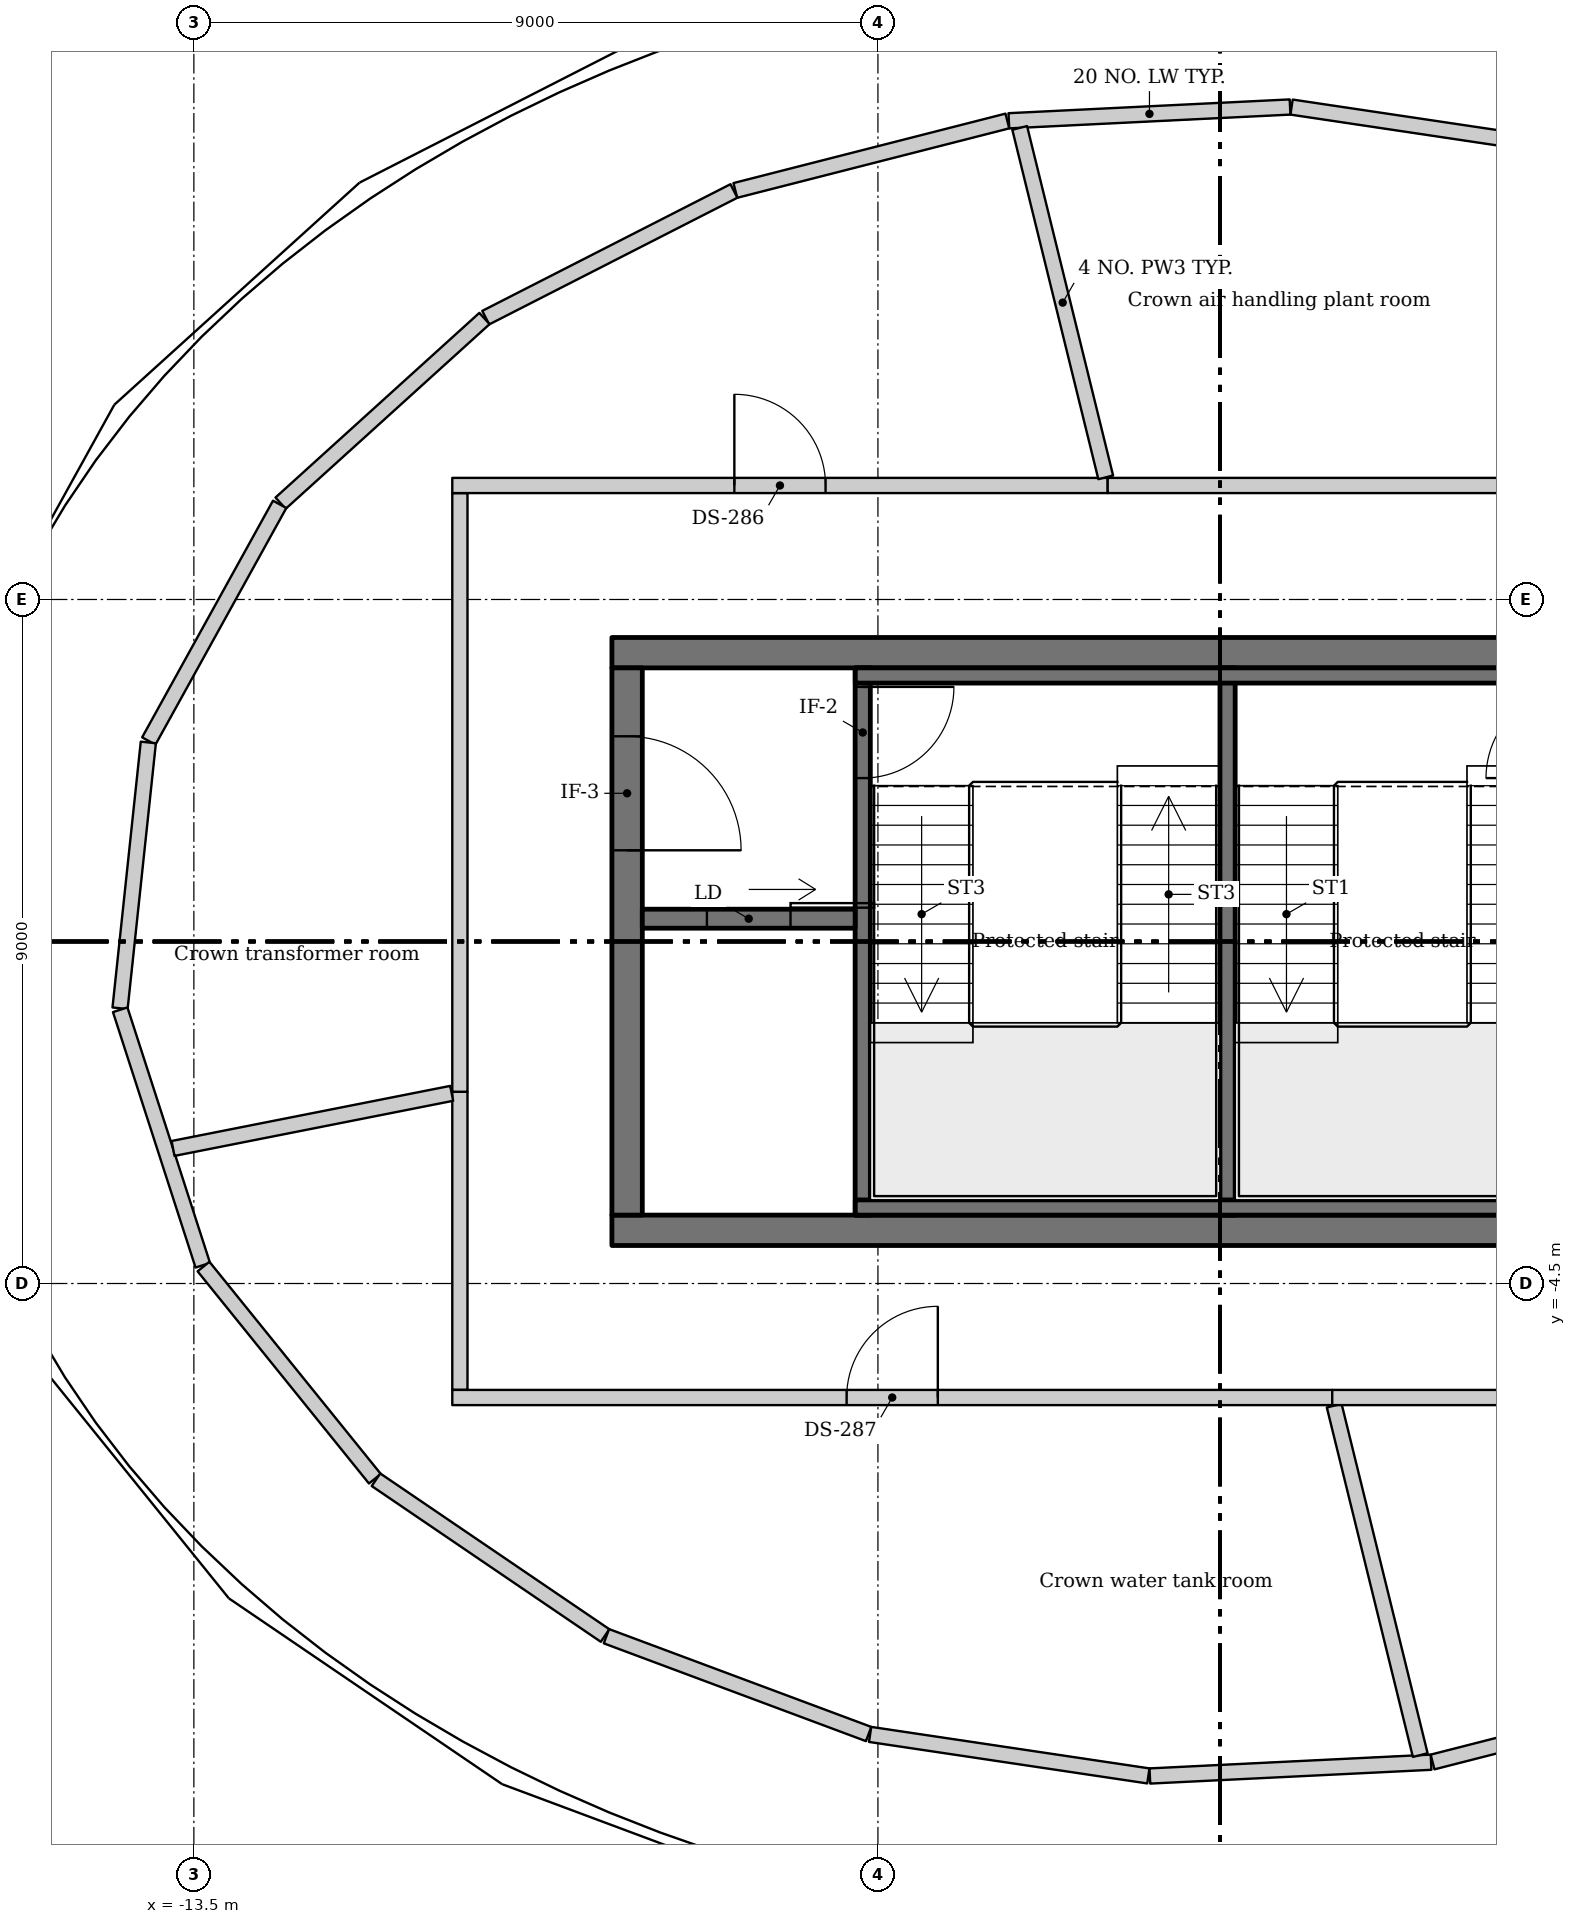
"""IFC4 building model, lengths in metres.
Left out: names, types, materials, properties, quantities, classifications, styles, units other than length and angle.
Written with IfcOpenShell. Run it as: python <this file> out.ifc"""

import sys

from ifc_helpers import new_model, si_unit, direction, frame, frame_2d, origin, place, context, subcontext, project, spatial, rectangle, extrude, source, transform, mapped, element, fill, save


model = new_model("IFC4")
c1 = context("Model", 3, precision=1e-05, world=origin(), true_north=direction((0.0, 1.0)))
c2 = subcontext(c1, "Body", "Model", "MODEL_VIEW")
j1 = project(units=[si_unit("LENGTHUNIT", "METRE"), si_unit("PLANEANGLEUNIT", "RADIAN")], contexts=[c1])
p1 = place(None, origin())
s1 = spatial("IfcSite", under=j1, at=p1, CompositionType="ELEMENT")
p2 = place(p1, origin())
s2 = spatial("IfcBuilding", under=s1, at=p2, CompositionType="ELEMENT")
p3 = place(p2, frame((0.0, 0.0, 361.0)))
s3 = spatial("IfcBuildingStorey", under=s2, at=p3, CompositionType="ELEMENT", Elevation=361.0)
m1 = source(origin(), c2, "Body", "SweptSolid", [
    extrude(rectangle(XDim=16.0, YDim=0.4, at=frame_2d((8.0, 0.0))), origin(), (0.0, 0.0, 1.0), 4.5),
])
for number, where, z_axis, x_axis in (
    (1, (-8.0, 3.8, -0.25), (0.0, 0.0, 1.0), (1.0, 0.0, 0.0)),
    (2, (-8.0, -3.8, -0.25), (0.0, 0.0, 1.0), (1.0, 0.0, 0.0)),
):
    element("IfcWall", number, at=place(p3, frame(where, z_axis=z_axis, x_axis=x_axis)), inside=s3, PredefinedType="SHEAR", context=c2, shape_type="MappedRepresentation", body=[
        mapped(m1, transform((0.0, 0.0, 0.0))),
    ])
m2 = source(origin(), c2, "Body", "SweptSolid", [
    extrude(rectangle(XDim=7.2, YDim=0.4, at=frame_2d((3.6, 0.0))), origin(), (0.0, 0.0, 1.0), 4.5),
])
p4 = place(p3, frame((-7.8, -3.6, -0.25), z_axis=(0.0, 0.0, 1.0), x_axis=(0.0, 1.0, 0.0)))
e3 = element("IfcWall", 3, at=p4, inside=s3, PredefinedType="SHEAR", context=c2, shape_type="MappedRepresentation", body=[
    mapped(m2, transform((0.0, 0.0, 0.0))),
])
m3 = source(origin(), c2, "Body", "SweptSolid", [
    extrude(rectangle(XDim=1.5, YDim=2.1, at=frame_2d((0.75, 1.05))), frame((0.0, 0.21, 0.0), z_axis=(0.0, -1.0, 0.0), x_axis=(1.0, 0.0, 0.0)), (0.0, 0.0, 1.0), 0.42),
])
p5 = place(p4, frame((4.8, 0.0, 0.25)))
e4 = element("IfcOpeningElement", 4, at=p5, cuts=e3, PredefinedType="OPENING", context=c2, shape_type="MappedRepresentation", body=[
    mapped(m3, transform((0.0, 0.0, 0.0))),
])
m4 = source(origin(), c2, "Body", "SweptSolid", [
    extrude(rectangle(XDim=3.701, YDim=0.2, at=frame_2d((1.851, 0.0))), origin(), (0.0, 0.0, 1.0), 4.25),
])
p6 = place(p3, frame((0.942, 10.979, 0.0), z_axis=(0.0, 0.0, 1.0), x_axis=(0.989053133618, -0.147559814586, 0.0)))
e5 = element("IfcWall", 5, at=p6, inside=s3, PredefinedType="SOLIDWALL", context=c2, shape_type="MappedRepresentation", body=[
    mapped(m4, transform((0.0, 0.0, 0.0))),
])
m5 = source(origin(), c2, "Body", "SweptSolid", [
    extrude(rectangle(XDim=3.704, YDim=0.2, at=frame_2d((1.852, 0.0))), origin(), (0.0, 0.0, 1.0), 4.25),
])
p7 = place(p3, frame((-2.777, 10.799, 0.0), z_axis=(0.0, 0.0, 1.0), x_axis=(0.998800036237, 0.04897435669, 0.0)))
e6 = element("IfcWall", 6, at=p7, inside=s3, PredefinedType="SOLIDWALL", context=c2, shape_type="MappedRepresentation", body=[
    mapped(m5, transform((0.0, 0.0, 0.0))),
])
m6 = source(origin(), c2, "Body", "SweptSolid", [
    extrude(rectangle(XDim=3.694, YDim=0.2, at=frame_2d((1.847, 0.0))), origin(), (0.0, 0.0, 1.0), 4.25),
])
p8 = place(p3, frame((-6.376, 9.882, 0.0), z_axis=(0.0, 0.0, 1.0), x_axis=(0.968929170675, 0.247338355731, 0.0)))
e7 = element("IfcWall", 7, at=p8, inside=s3, PredefinedType="SOLIDWALL", context=c2, shape_type="MappedRepresentation", body=[
    mapped(m6, transform((0.0, 0.0, 0.0))),
])
m7 = source(origin(), c2, "Body", "SweptSolid", [
    extrude(rectangle(XDim=3.666, YDim=0.2, at=frame_2d((1.833, 0.0))), origin(), (0.0, 0.0, 1.0), 4.25),
])
p9 = place(p3, frame((-9.66, 8.208, 0.0), z_axis=(0.0, 0.0, 1.0), x_axis=(0.89069419258, 0.454602964469, 0.0)))
e8 = element("IfcWall", 8, at=p9, inside=s3, PredefinedType="SOLIDWALL", context=c2, shape_type="MappedRepresentation", body=[
    mapped(m7, transform((0.0, 0.0, 0.0))),
])
m8 = source(origin(), c2, "Body", "SweptSolid", [
    extrude(rectangle(XDim=3.619, YDim=0.2, at=frame_2d((1.81, 0.0))), origin(), (0.0, 0.0, 1.0), 4.25),
])
p10 = place(p3, frame((-12.359, 5.767, 0.0), z_axis=(0.0, 0.0, 1.0), x_axis=(0.741120145492, 0.671372422688, 0.0)))
e9 = element("IfcWall", 9, at=p10, inside=s3, PredefinedType="SOLIDWALL", context=c2, shape_type="MappedRepresentation", body=[
    mapped(m8, transform((0.0, 0.0, 0.0))),
])
m9 = source(origin(), c2, "Body", "SweptSolid", [
    extrude(rectangle(XDim=3.559, YDim=0.2, at=frame_2d((1.779, 0.0))), origin(), (0.0, 0.0, 1.0), 4.25),
])
p11 = place(p3, frame((-14.093, 2.638, 0.0), z_axis=(0.0, 0.0, 1.0), x_axis=(0.483958553542, 0.875090920107, 0.0)))
e10 = element("IfcWall", 10, at=p11, inside=s3, PredefinedType="SOLIDWALL", context=c2, shape_type="MappedRepresentation", body=[
    mapped(m9, transform((0.0, 0.0, 0.0))),
])
m10 = source(origin(), c2, "Body", "SweptSolid", [
    extrude(rectangle(XDim=3.518, YDim=0.2, at=frame_2d((1.759, 0.0))), origin(), (0.0, 0.0, 1.0), 4.25),
])
p12 = place(p3, frame((-14.471, -0.879, 0.0), z_axis=(0.0, 0.0, 1.0), x_axis=(0.105775833098, 0.994390000519, 0.0)))
e11 = element("IfcWall", 11, at=p12, inside=s3, PredefinedType="SOLIDWALL", context=c2, shape_type="MappedRepresentation", body=[
    mapped(m10, transform((0.0, 0.0, 0.0))),
])
m11 = source(origin(), c2, "Body", "SweptSolid", [
    extrude(rectangle(XDim=3.532, YDim=0.2, at=frame_2d((1.766, 0.0))), origin(), (0.0, 0.0, 1.0), 4.25),
])
p13 = place(p3, frame((-13.383, -4.26, 0.0), z_axis=(0.0, 0.0, 1.0), x_axis=(-0.307547938379, 0.951532587776, 0.0)))
e12 = element("IfcWall", 12, at=p13, inside=s3, PredefinedType="SOLIDWALL", context=c2, shape_type="MappedRepresentation", body=[
    mapped(m11, transform((0.0, 0.0, 0.0))),
])
m12 = source(origin(), c2, "Body", "SweptSolid", [
    extrude(rectangle(XDim=3.589, YDim=0.2, at=frame_2d((1.794, 0.0))), origin(), (0.0, 0.0, 1.0), 4.25),
])
p14 = place(p3, frame((-11.118, -7.069, 0.0), z_axis=(0.0, 0.0, 1.0), x_axis=(-0.62833869063, 0.777939901186, 0.0)))
e13 = element("IfcWall", 13, at=p14, inside=s3, PredefinedType="SOLIDWALL", context=c2, shape_type="MappedRepresentation", body=[
    mapped(m12, transform((0.0, 0.0, 0.0))),
])
m13 = source(origin(), c2, "Body", "SweptSolid", [
    extrude(rectangle(XDim=3.645, YDim=0.2, at=frame_2d((1.823, 0.0))), origin(), (0.0, 0.0, 1.0), 4.25),
])
p15 = place(p3, frame((-8.09, -9.132, 0.0), z_axis=(0.0, 0.0, 1.0), x_axis=(-0.826956398418, 0.562266053675, 0.0)))
e14 = element("IfcWall", 14, at=p15, inside=s3, PredefinedType="SOLIDWALL", context=c2, shape_type="MappedRepresentation", body=[
    mapped(m13, transform((0.0, 0.0, 0.0))),
])
m14 = source(origin(), c2, "Body", "SweptSolid", [
    extrude(rectangle(XDim=3.682, YDim=0.2, at=frame_2d((1.841, 0.0))), origin(), (0.0, 0.0, 1.0), 4.25),
])
p16 = place(p3, frame((-4.622, -10.428, 0.0), z_axis=(0.0, 0.0, 1.0), x_axis=(-0.936897406931, 0.349604417716, 0.0)))
e15 = element("IfcWall", 15, at=p16, inside=s3, PredefinedType="SOLIDWALL", context=c2, shape_type="MappedRepresentation", body=[
    mapped(m14, transform((0.0, 0.0, 0.0))),
])
p17 = place(p3, frame((-0.942, -10.979, 0.0), z_axis=(0.0, 0.0, 1.0), x_axis=(-0.989053133618, 0.147559814586, 0.0)))
e16 = element("IfcWall", 16, at=p17, inside=s3, PredefinedType="SOLIDWALL", context=c2, shape_type="MappedRepresentation", body=[
    mapped(m4, transform((0.0, 0.0, 0.0))),
])
p18 = place(p3, frame((2.777, -10.799, 0.0), z_axis=(0.0, 0.0, 1.0), x_axis=(-0.998800036237, -0.04897435669, 0.0)))
e17 = element("IfcWall", 17, at=p18, inside=s3, PredefinedType="SOLIDWALL", context=c2, shape_type="MappedRepresentation", body=[
    mapped(m5, transform((0.0, 0.0, 0.0))),
])
p19 = place(p3, frame((6.376, -9.882, 0.0), z_axis=(0.0, 0.0, 1.0), x_axis=(-0.968929170675, -0.247338355731, 0.0)))
e18 = element("IfcWall", 18, at=p19, inside=s3, PredefinedType="SOLIDWALL", context=c2, shape_type="MappedRepresentation", body=[
    mapped(m6, transform((0.0, 0.0, 0.0))),
])
m15 = source(origin(), c2, "Body", "SweptSolid", [
    extrude(rectangle(XDim=7.2, YDim=0.2, at=frame_2d((3.6, 0.0))), origin(), (0.0, 0.0, 1.0), 4.25),
])
p20 = place(p3, frame((0.1, 3.6, 0.0), z_axis=(0.0, 0.0, 1.0), x_axis=(0.0, -1.0, 0.0)))
e19 = element("IfcWall", 19, at=p20, inside=s3, PredefinedType="SHEAR", context=c2, shape_type="MappedRepresentation", body=[
    mapped(m15, transform((0.0, 0.0, 0.0))),
])
p21 = place(p3, frame((-4.7, 3.6, 0.0), z_axis=(0.0, 0.0, 1.0), x_axis=(0.0, -1.0, 0.0)))
e20 = element("IfcWall", 20, at=p21, inside=s3, PredefinedType="SHEAR", context=c2, shape_type="MappedRepresentation", body=[
    mapped(m15, transform((0.0, 0.0, 0.0))),
])
m16 = source(origin(), c2, "Body", "SweptSolid", [
    extrude(rectangle(XDim=1.2, YDim=2.1, at=frame_2d((0.6, 1.05))), frame((0.0, 0.11, 0.0), z_axis=(0.0, -1.0, 0.0), x_axis=(1.0, 0.0, 0.0)), (0.0, 0.0, 1.0), 0.22),
])
p22 = place(p21, frame((0.25, 0.0, 0.0)))
e21 = element("IfcOpeningElement", 21, at=p22, cuts=e20, PredefinedType="OPENING", context=c2, shape_type="MappedRepresentation", body=[
    mapped(m16, transform((0.0, 0.0, 0.0))),
])
m17 = source(origin(), c2, "Body", "SweptSolid", [
    extrude(rectangle(XDim=2.8, YDim=0.25, at=frame_2d((1.4, 0.0))), origin(), (0.0, 0.0, 1.0), 4.25),
])
p23 = place(p3, frame((-4.8, 0.3, 0.0), z_axis=(0.0, 0.0, 1.0), x_axis=(-1.0, 0.0, 0.0)))
e22 = element("IfcWall", 22, at=p23, inside=s3, PredefinedType="SHEAR", context=c2, shape_type="MappedRepresentation", body=[
    mapped(m17, transform((0.0, 0.0, 0.0))),
])
m18 = source(origin(), c2, "Body", "SweptSolid", [
    extrude(rectangle(XDim=1.1, YDim=2.1, at=frame_2d((0.55, 1.05))), frame((0.0, 0.135, 0.0), z_axis=(0.0, -1.0, 0.0), x_axis=(1.0, 0.0, 0.0)), (0.0, 0.0, 1.0), 0.27),
])
p24 = place(p23, frame((0.85, 0.0, 0.0)))
e23 = element("IfcOpeningElement", 23, at=p24, cuts=e22, PredefinedType="OPENING", context=c2, shape_type="MappedRepresentation", body=[
    mapped(m18, transform((0.0, 0.0, 0.0))),
])
m19 = source(origin(), c2, "Body", "SweptSolid", [
    extrude(rectangle(XDim=9.596, YDim=0.2, at=frame_2d((4.798, 0.0))), origin(), (0.0, 0.0, 1.0), 4.25),
])
for number, where, z_axis, x_axis in (
    (24, (-4.798, -3.5, 0.0), (0.0, 0.0, 1.0), (1.0, 0.0, 0.0)),
    (25, (4.798, 3.5, 0.0), (0.0, 0.0, 1.0), (-1.0, 0.0, 0.0)),
):
    element("IfcWall", number, at=place(p3, frame(where, z_axis=z_axis, x_axis=x_axis)), inside=s3, PredefinedType="SHEAR", context=c2, shape_type="MappedRepresentation", body=[
        mapped(m19, transform((0.0, 0.0, 0.0))),
    ])
m20 = source(origin(), c2, "Body", "SweptSolid", [
    extrude(rectangle(XDim=3.923, YDim=0.2, at=frame_2d((1.961, 0.0))), origin(), (0.0, 0.0, 1.0), 4.25),
])
p25 = place(p3, frame((-10.0, -5.9, 0.0), z_axis=(0.0, 0.0, 1.0), x_axis=(0.0, 1.0, 0.0)))
e26 = element("IfcWall", 26, at=p25, inside=s3, PredefinedType="PARTITIONING", context=c2, shape_type="MappedRepresentation", body=[
    mapped(m20, transform((0.0, 0.0, 0.0))),
])
m21 = source(origin(), c2, "Body", "SweptSolid", [
    extrude(rectangle(XDim=3.737, YDim=0.2, at=frame_2d((1.869, 0.0))), origin(), (0.0, 0.0, 1.0), 4.25),
])
p26 = place(p3, frame((-10.108, -1.998, 0.0), z_axis=(0.0, 0.0, 1.0), x_axis=(-0.981007998173, -0.193967284668, 0.0)))
e27 = element("IfcWall", 27, at=p26, inside=s3, PredefinedType="PARTITIONING", context=c2, shape_type="MappedRepresentation", body=[
    mapped(m21, transform((0.0, 0.0, 0.0))),
])
m22 = source(origin(), c2, "Body", "SweptSolid", [
    extrude(rectangle(XDim=7.877, YDim=0.2, at=frame_2d((3.938, 0.0))), origin(), (0.0, 0.0, 1.0), 4.25),
])
p27 = place(p3, frame((-10.0, -1.977, 0.0), z_axis=(0.0, 0.0, 1.0), x_axis=(0.0, 1.0, 0.0)))
e28 = element("IfcWall", 28, at=p27, inside=s3, PredefinedType="PARTITIONING", context=c2, shape_type="MappedRepresentation", body=[
    mapped(m22, transform((0.0, 0.0, 0.0))),
])
m23 = source(origin(), c2, "Body", "SweptSolid", [
    extrude(rectangle(XDim=8.623, YDim=0.2, at=frame_2d((4.312, 0.0))), origin(), (0.0, 0.0, 1.0), 4.25),
])
p28 = place(p3, frame((-10.1, 6.0, 0.0), z_axis=(0.0, 0.0, 1.0), x_axis=(1.0, 0.0, 0.0)))
e29 = element("IfcWall", 29, at=p28, inside=s3, PredefinedType="PARTITIONING", context=c2, shape_type="MappedRepresentation", body=[
    mapped(m23, transform((0.0, 0.0, 0.0))),
])
p29 = place(p28, frame((3.711, 0.0, 0.0)))
e30 = element("IfcOpeningElement", 30, at=p29, cuts=e29, PredefinedType="OPENING", context=c2, shape_type="MappedRepresentation", body=[
    mapped(m16, transform((0.0, 0.0, 0.0))),
])
m24 = source(origin(), c2, "Body", "SweptSolid", [
    extrude(rectangle(XDim=4.735, YDim=0.2, at=frame_2d((2.368, 0.0))), origin(), (0.0, 0.0, 1.0), 4.25),
])
p30 = place(p3, frame((-1.503, 6.107, 0.0), z_axis=(0.0, 0.0, 1.0), x_axis=(-0.239064665941, 0.971003648551, 0.0)))
e31 = element("IfcWall", 31, at=p30, inside=s3, PredefinedType="PARTITIONING", context=c2, shape_type="MappedRepresentation", body=[
    mapped(m24, transform((0.0, 0.0, 0.0))),
])
m25 = source(origin(), c2, "Body", "SweptSolid", [
    extrude(rectangle(XDim=11.577, YDim=0.2, at=frame_2d((5.789, 0.0))), origin(), (0.0, 0.0, 1.0), 4.25),
])
p31 = place(p3, frame((-1.477, 6.0, 0.0), z_axis=(0.0, 0.0, 1.0), x_axis=(1.0, 0.0, 0.0)))
e32 = element("IfcWall", 32, at=p31, inside=s3, PredefinedType="PARTITIONING", context=c2, shape_type="MappedRepresentation", body=[
    mapped(m25, transform((0.0, 0.0, 0.0))),
])
p32 = place(p31, frame((5.189, 0.0, 0.0)))
e33 = element("IfcOpeningElement", 33, at=p32, cuts=e32, PredefinedType="OPENING", context=c2, shape_type="MappedRepresentation", body=[
    mapped(m16, transform((0.0, 0.0, 0.0))),
])
p33 = place(p3, frame((1.477, -6.0, 0.0), z_axis=(0.0, 0.0, 1.0), x_axis=(-1.0, 0.0, 0.0)))
e34 = element("IfcWall", 34, at=p33, inside=s3, PredefinedType="PARTITIONING", context=c2, shape_type="MappedRepresentation", body=[
    mapped(m25, transform((0.0, 0.0, 0.0))),
])
p34 = place(p33, frame((5.189, 0.0, 0.0)))
e35 = element("IfcOpeningElement", 35, at=p34, cuts=e34, PredefinedType="OPENING", context=c2, shape_type="MappedRepresentation", body=[
    mapped(m16, transform((0.0, 0.0, 0.0))),
])
p35 = place(p3, frame((1.503, -6.107, 0.0), z_axis=(0.0, 0.0, 1.0), x_axis=(0.239064665941, -0.971003648551, 0.0)))
e36 = element("IfcWall", 36, at=p35, inside=s3, PredefinedType="PARTITIONING", context=c2, shape_type="MappedRepresentation", body=[
    mapped(m24, transform((0.0, 0.0, 0.0))),
])
p36 = place(p3, frame((10.1, -6.0, 0.0), z_axis=(0.0, 0.0, 1.0), x_axis=(-1.0, 0.0, 0.0)))
e37 = element("IfcWall", 37, at=p36, inside=s3, PredefinedType="PARTITIONING", context=c2, shape_type="MappedRepresentation", body=[
    mapped(m23, transform((0.0, 0.0, 0.0))),
])
p37 = place(p36, frame((3.711, 0.0, 0.0)))
e38 = element("IfcOpeningElement", 38, at=p37, cuts=e37, PredefinedType="OPENING", context=c2, shape_type="MappedRepresentation", body=[
    mapped(m16, transform((0.0, 0.0, 0.0))),
])
m26 = source(origin(), c2, "Body", "SweptSolid", [
    extrude(rectangle(XDim=1.1, YDim=2.1, at=frame_2d((0.55, 1.05))), frame((0.0, 0.025, 0.0), z_axis=(0.0, -1.0, 0.0), x_axis=(1.0, 0.0, 0.0)), (0.0, 0.0, 1.0), 0.05),
])
p38 = place(p24, origin())
e39 = element("IfcDoor", 39, at=p38, inside=s3, OperationType="SLIDING_TO_LEFT", PredefinedType="DOOR", context=c2, shape_type="MappedRepresentation", body=[
    mapped(m26, transform((0.0, 0.0, 0.0))),
])
fill(e23, e39)
m27 = source(origin(), c2, "Body", "SweptSolid", [
    extrude(rectangle(XDim=1.2, YDim=2.1, at=frame_2d((0.6, 1.05))), frame((0.0, 0.025, 0.0), z_axis=(0.0, -1.0, 0.0), x_axis=(1.0, 0.0, 0.0)), (0.0, 0.0, 1.0), 0.05),
])
p39 = place(p22, origin())
e40 = element("IfcDoor", 40, at=p39, inside=s3, OperationType="SINGLE_SWING_RIGHT", PredefinedType="DOOR", context=c2, shape_type="MappedRepresentation", body=[
    mapped(m27, transform((0.0, 0.0, 0.0))),
])
fill(e21, e40)
m28 = source(origin(), c2, "Body", "SweptSolid", [
    extrude(rectangle(XDim=1.5, YDim=2.1, at=frame_2d((0.75, 1.05))), frame((0.0, 0.025, 0.0), z_axis=(0.0, -1.0, 0.0), x_axis=(1.0, 0.0, 0.0)), (0.0, 0.0, 1.0), 0.05),
])
p40 = place(p5, origin())
e41 = element("IfcDoor", 41, at=p40, inside=s3, OperationType="DOUBLE_DOOR_SINGLE_SWING", PredefinedType="DOOR", context=c2, shape_type="MappedRepresentation", body=[
    mapped(m28, transform((0.0, 0.0, 0.0))),
])
fill(e4, e41)
m29 = source(origin(), c2, "Body", "SweptSolid", [
    extrude(rectangle(XDim=1.2, YDim=2.1, at=frame_2d((0.6, 1.05))), frame((0.0, 0.025, 0.0), z_axis=(0.0, -1.0, 0.0), x_axis=(1.0, 0.0, 0.0)), (0.0, 0.0, 1.0), 0.05),
])
p41 = place(p29, origin())
e42 = element("IfcDoor", 42, at=p41, inside=s3, OperationType="SINGLE_SWING_LEFT", PredefinedType="DOOR", context=c2, shape_type="MappedRepresentation", body=[
    mapped(m29, transform((0.0, 0.0, 0.0))),
])
fill(e30, e42)
p42 = place(p34, origin())
e43 = element("IfcDoor", 43, at=p42, inside=s3, OperationType="SINGLE_SWING_LEFT", PredefinedType="DOOR", context=c2, shape_type="MappedRepresentation", body=[
    mapped(m29, transform((0.0, 0.0, 0.0))),
])
fill(e35, e43)
save(model, sys.argv[1])
